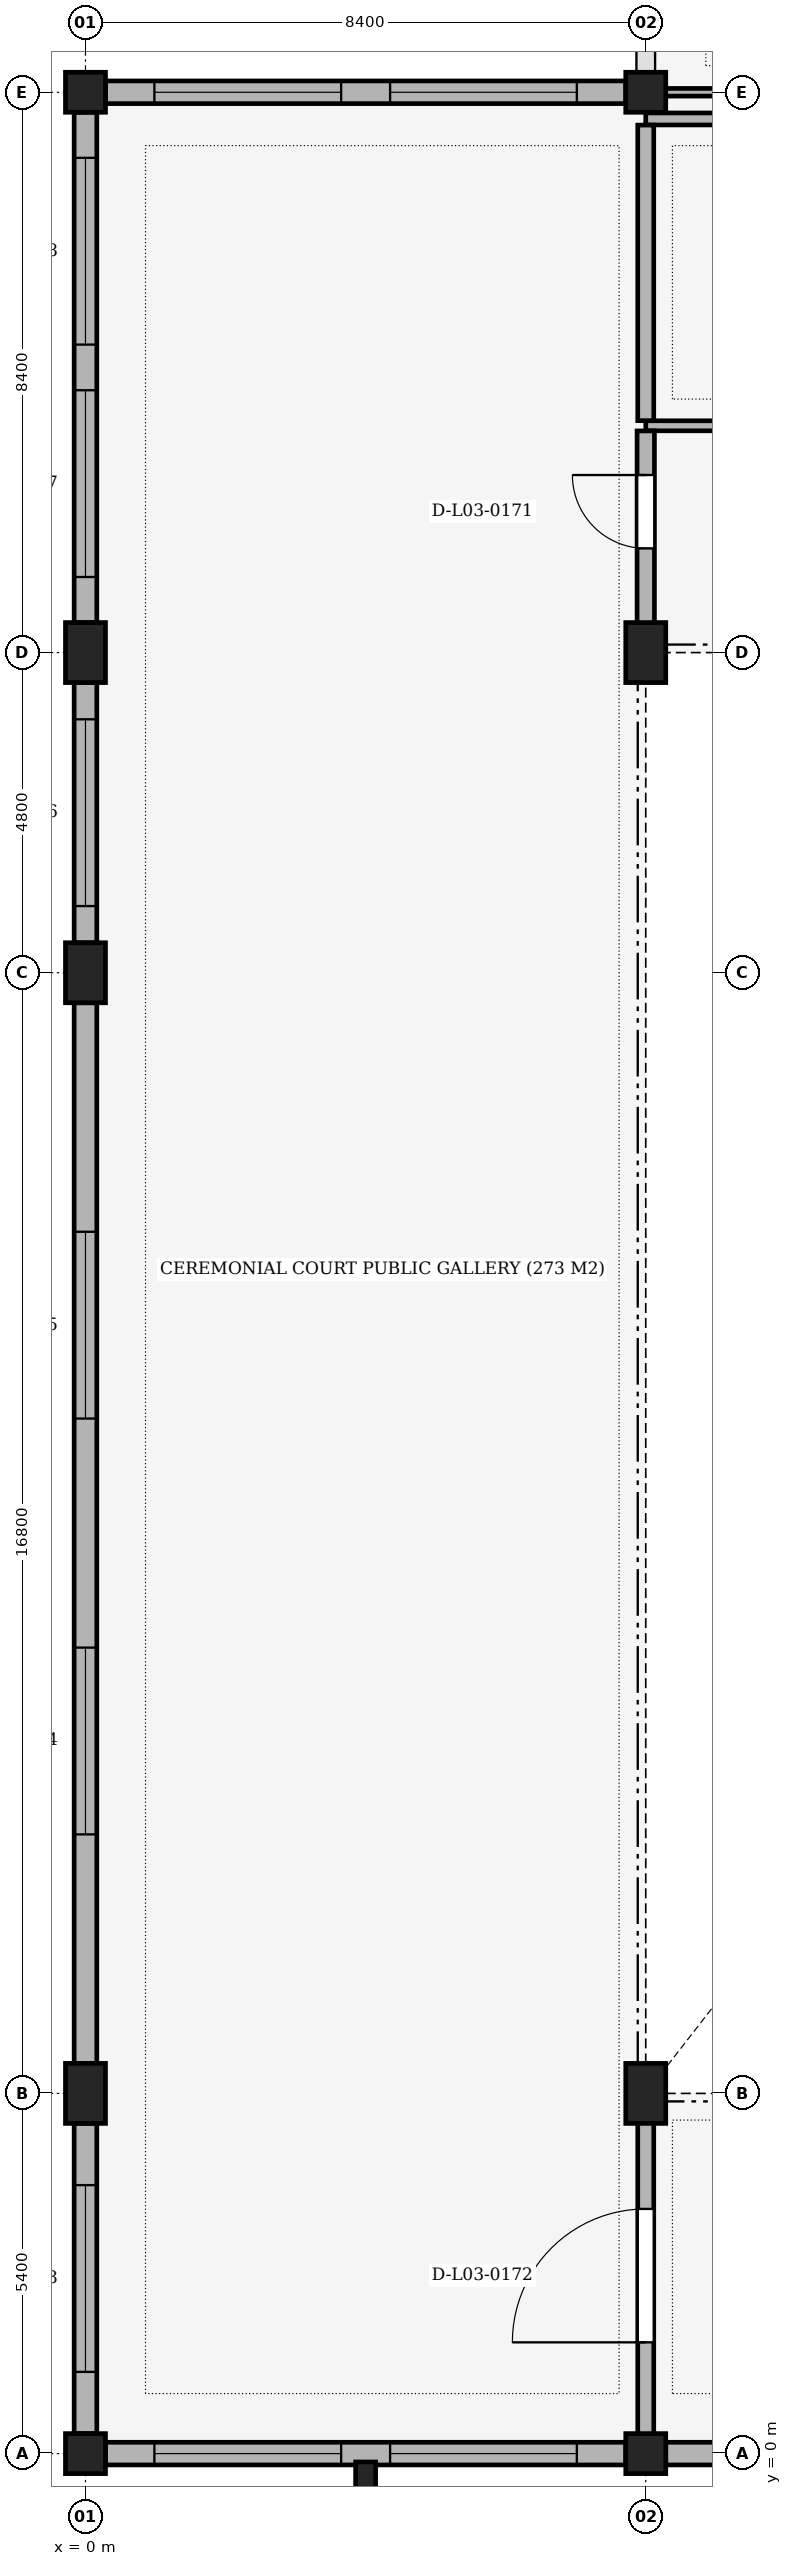
"""IFC4 building model, lengths in metres.
Left out: names, types, materials, properties, quantities, classifications, styles, units other than length and angle.
Written with IfcOpenShell. Run it as: python <this file> out.ifc"""

import sys

from ifc_helpers import new_model, si_unit, direction, frame, frame_2d, origin, origin_with_axes, origin_2d, place, context, subcontext, project, spatial, rectangle, extrude, element, fill, save


model = new_model("IFC4")
c1 = context("Model", 3, precision=1e-05, world=origin(), true_north=direction((0.0, 1.0)))
c2 = subcontext(c1, "Body", "Model", "MODEL_VIEW")
j1 = project(units=[si_unit("LENGTHUNIT", "METRE"), si_unit("PLANEANGLEUNIT", "RADIAN")], contexts=[c1])
p1 = place(None, origin())
s1 = spatial("IfcSite", under=j1, at=p1, CompositionType="ELEMENT")
p2 = place(p1, origin())
s2 = spatial("IfcBuilding", under=s1, at=p2, CompositionType="ELEMENT")
p3 = place(p2, frame((0.0, 0.0, 15.3)))
s3 = spatial("IfcBuildingStorey", under=s2, at=p3, CompositionType="ELEMENT", Elevation=15.3)
p4 = place(p3, origin_with_axes())
e1 = element("IfcColumn", 1, at=p4, inside=s3, PredefinedType="COLUMN", context=c2, shape_type="SweptSolid", body=[
    extrude(rectangle(XDim=0.6, YDim=0.6, at=origin_2d()), origin(), (0.0, 0.0, 1.0), 5.1),
])
for number, where, z_axis, x_axis in (
    (2, (0.0, 5.4, 0.0), (0.0, 0.0, 1.0), (1.0, 0.0, 0.0)),
    (3, (0.0, 22.2, 0.0), (0.0, 0.0, 1.0), (1.0, 0.0, 0.0)),
    (4, (0.0, 27.0, 0.0), (0.0, 0.0, 1.0), (1.0, 0.0, 0.0)),
):
    element("IfcColumn", number, at=place(p3, frame(where, z_axis=z_axis, x_axis=x_axis)), inside=s3, PredefinedType="COLUMN", context=c2, shape_type="SweptSolid", body=[
        extrude(rectangle(XDim=0.6, YDim=0.9, at=origin_2d()), origin(), (0.0, 0.0, 1.0), 5.1),
    ])
for number, where, z_axis, x_axis in (
    (5, (0.0, 35.4, 0.0), (0.0, 0.0, 1.0), (1.0, 0.0, 0.0)),
    (6, (8.4, 0.0, 0.0), (0.0, 0.0, 1.0), (1.0, 0.0, 0.0)),
):
    element("IfcColumn", number, at=place(p3, frame(where, z_axis=z_axis, x_axis=x_axis)), inside=s3, PredefinedType="COLUMN", context=c2, shape_type="SweptSolid", body=[
        extrude(rectangle(XDim=0.6, YDim=0.6, at=origin_2d()), origin(), (0.0, 0.0, 1.0), 5.1),
    ])
for number, where, z_axis, x_axis in (
    (7, (8.4, 5.4, 0.0), (0.0, 0.0, 1.0), (1.0, 0.0, 0.0)),
    (8, (8.4, 27.0, 0.0), (0.0, 0.0, 1.0), (1.0, 0.0, 0.0)),
):
    element("IfcColumn", number, at=place(p3, frame(where, z_axis=z_axis, x_axis=x_axis)), inside=s3, PredefinedType="COLUMN", context=c2, shape_type="SweptSolid", body=[
        extrude(rectangle(XDim=0.6, YDim=0.9, at=origin_2d()), origin(), (0.0, 0.0, 1.0), 5.1),
    ])
p5 = place(p3, frame((8.4, 35.4, 0.0), z_axis=(0.0, 0.0, 1.0), x_axis=(1.0, 0.0, 0.0)))
e9 = element("IfcColumn", 9, at=p5, inside=s3, PredefinedType="COLUMN", context=c2, shape_type="SweptSolid", body=[
    extrude(rectangle(XDim=0.6, YDim=0.6, at=origin_2d()), origin(), (0.0, 0.0, 1.0), 5.1),
])
p6 = place(p3, frame((4.2, -0.35, 0.0), z_axis=(0.0, 0.0, 1.0), x_axis=(1.0, 0.0, 0.0)))
e10 = element("IfcColumn", 10, at=p6, inside=s3, PredefinedType="PILASTER", context=c2, shape_type="SweptSolid", body=[
    extrude(rectangle(XDim=0.3, YDim=0.45, at=origin_2d()), origin(), (0.0, 0.0, 1.0), 5.1),
])
p7 = place(p3, frame((0.3, 35.4, 0.0), z_axis=(0.0, 0.0, 1.0), x_axis=(1.0, 0.0, 0.0)))
e11 = element("IfcWall", 11, at=p7, inside=s3, PredefinedType="SOLIDWALL", context=c2, shape_type="SweptSolid", body=[
    extrude(rectangle(XDim=7.8, YDim=0.34, at=frame_2d((3.9, 0.0))), origin(), (0.0, 0.0, 1.0), 4.14),
])
p8 = place(p7, frame((0.733, 0.0, 0.75)))
e12 = element("IfcOpeningElement", 12, at=p8, cuts=e11, PredefinedType="OPENING", context=c2, shape_type="SweptSolid", body=[
    extrude(rectangle(XDim=2.8, YDim=2.6, at=frame_2d((1.4, 1.3))), frame((0.0, 0.185, 0.0), z_axis=(0.0, -1.0, 0.0), x_axis=(1.0, 0.0, 0.0)), (0.0, 0.0, 1.0), 0.37),
])
p9 = place(p7, frame((4.267, 0.0, 0.75)))
e13 = element("IfcOpeningElement", 13, at=p9, cuts=e11, PredefinedType="OPENING", context=c2, shape_type="SweptSolid", body=[
    extrude(rectangle(XDim=2.8, YDim=2.6, at=frame_2d((1.4, 1.3))), frame((0.0, 0.185, 0.0), z_axis=(0.0, -1.0, 0.0), x_axis=(1.0, 0.0, 0.0)), (0.0, 0.0, 1.0), 0.37),
])
p10 = place(p3, frame((16.5, 0.0, 0.0), z_axis=(0.0, 0.0, 1.0), x_axis=(-1.0, 0.0, 0.0)))
e14 = element("IfcWall", 14, at=p10, inside=s3, PredefinedType="SOLIDWALL", context=c2, shape_type="SweptSolid", body=[
    extrude(rectangle(XDim=7.8, YDim=0.34, at=frame_2d((3.9, 0.0))), origin(), (0.0, 0.0, 1.0), 4.14),
])
p11 = place(p10, frame((0.733, 0.0, 0.75)))
e15 = element("IfcOpeningElement", 15, at=p11, cuts=e14, PredefinedType="OPENING", context=c2, shape_type="SweptSolid", body=[
    extrude(rectangle(XDim=2.8, YDim=2.6, at=frame_2d((1.4, 1.3))), frame((0.0, 0.185, 0.0), z_axis=(0.0, -1.0, 0.0), x_axis=(1.0, 0.0, 0.0)), (0.0, 0.0, 1.0), 0.37),
])
p12 = place(p10, frame((4.267, 0.0, 0.75)))
e16 = element("IfcOpeningElement", 16, at=p12, cuts=e14, PredefinedType="OPENING", context=c2, shape_type="SweptSolid", body=[
    extrude(rectangle(XDim=2.8, YDim=2.6, at=frame_2d((1.4, 1.3))), frame((0.0, 0.185, 0.0), z_axis=(0.0, -1.0, 0.0), x_axis=(1.0, 0.0, 0.0)), (0.0, 0.0, 1.0), 0.37),
])
p13 = place(p3, frame((8.1, 0.0, 0.0), z_axis=(0.0, 0.0, 1.0), x_axis=(-1.0, 0.0, 0.0)))
e17 = element("IfcWall", 17, at=p13, inside=s3, PredefinedType="SOLIDWALL", context=c2, shape_type="SweptSolid", body=[
    extrude(rectangle(XDim=7.8, YDim=0.34, at=frame_2d((3.9, 0.0))), origin(), (0.0, 0.0, 1.0), 4.14),
])
p14 = place(p13, frame((0.733, 0.0, 0.75)))
e18 = element("IfcOpeningElement", 18, at=p14, cuts=e17, PredefinedType="OPENING", context=c2, shape_type="SweptSolid", body=[
    extrude(rectangle(XDim=2.8, YDim=2.6, at=frame_2d((1.4, 1.3))), frame((0.0, 0.185, 0.0), z_axis=(0.0, -1.0, 0.0), x_axis=(1.0, 0.0, 0.0)), (0.0, 0.0, 1.0), 0.37),
])
p15 = place(p13, frame((4.267, 0.0, 0.75)))
e19 = element("IfcOpeningElement", 19, at=p15, cuts=e17, PredefinedType="OPENING", context=c2, shape_type="SweptSolid", body=[
    extrude(rectangle(XDim=2.8, YDim=2.6, at=frame_2d((1.4, 1.3))), frame((0.0, 0.185, 0.0), z_axis=(0.0, -1.0, 0.0), x_axis=(1.0, 0.0, 0.0)), (0.0, 0.0, 1.0), 0.37),
])
p16 = place(p3, frame((0.0, 0.3, 0.0), z_axis=(0.0, 0.0, 1.0), x_axis=(0.0, 1.0, 0.0)))
e20 = element("IfcWall", 20, at=p16, inside=s3, PredefinedType="SOLIDWALL", context=c2, shape_type="SweptSolid", body=[
    extrude(rectangle(XDim=4.65, YDim=0.34, at=frame_2d((2.325, 0.0))), origin(), (0.0, 0.0, 1.0), 4.29),
])
p17 = place(p16, frame((0.925, 0.0, 0.75)))
e21 = element("IfcOpeningElement", 21, at=p17, cuts=e20, PredefinedType="OPENING", context=c2, shape_type="SweptSolid", body=[
    extrude(rectangle(XDim=2.8, YDim=2.6, at=frame_2d((1.4, 1.3))), frame((0.0, 0.185, 0.0), z_axis=(0.0, -1.0, 0.0), x_axis=(1.0, 0.0, 0.0)), (0.0, 0.0, 1.0), 0.37),
])
p18 = place(p3, frame((0.0, 5.85, 0.0), z_axis=(0.0, 0.0, 1.0), x_axis=(0.0, 1.0, 0.0)))
e22 = element("IfcWall", 22, at=p18, inside=s3, PredefinedType="SOLIDWALL", context=c2, shape_type="SweptSolid", body=[
    extrude(rectangle(XDim=15.9, YDim=0.34, at=frame_2d((7.95, 0.0))), origin(), (0.0, 0.0, 1.0), 3.79),
])
p19 = place(p18, frame((3.433, 0.0, 0.75)))
e23 = element("IfcOpeningElement", 23, at=p19, cuts=e22, PredefinedType="OPENING", context=c2, shape_type="SweptSolid", body=[
    extrude(rectangle(XDim=2.8, YDim=2.6, at=frame_2d((1.4, 1.3))), frame((0.0, 0.185, 0.0), z_axis=(0.0, -1.0, 0.0), x_axis=(1.0, 0.0, 0.0)), (0.0, 0.0, 1.0), 0.37),
])
p20 = place(p18, frame((9.667, 0.0, 0.75)))
e24 = element("IfcOpeningElement", 24, at=p20, cuts=e22, PredefinedType="OPENING", context=c2, shape_type="SweptSolid", body=[
    extrude(rectangle(XDim=2.8, YDim=2.6, at=frame_2d((1.4, 1.3))), frame((0.0, 0.185, 0.0), z_axis=(0.0, -1.0, 0.0), x_axis=(1.0, 0.0, 0.0)), (0.0, 0.0, 1.0), 0.37),
])
p21 = place(p3, frame((0.0, 22.65, 0.0), z_axis=(0.0, 0.0, 1.0), x_axis=(0.0, 1.0, 0.0)))
e25 = element("IfcWall", 25, at=p21, inside=s3, PredefinedType="SOLIDWALL", context=c2, shape_type="SweptSolid", body=[
    extrude(rectangle(XDim=3.9, YDim=0.34, at=frame_2d((1.95, 0.0))), origin(), (0.0, 0.0, 1.0), 4.29),
])
p22 = place(p21, frame((0.55, 0.0, 0.75)))
e26 = element("IfcOpeningElement", 26, at=p22, cuts=e25, PredefinedType="OPENING", context=c2, shape_type="SweptSolid", body=[
    extrude(rectangle(XDim=2.8, YDim=2.6, at=frame_2d((1.4, 1.3))), frame((0.0, 0.185, 0.0), z_axis=(0.0, -1.0, 0.0), x_axis=(1.0, 0.0, 0.0)), (0.0, 0.0, 1.0), 0.37),
])
p23 = place(p3, frame((0.0, 27.45, 0.0), z_axis=(0.0, 0.0, 1.0), x_axis=(0.0, 1.0, 0.0)))
e27 = element("IfcWall", 27, at=p23, inside=s3, PredefinedType="SOLIDWALL", context=c2, shape_type="SweptSolid", body=[
    extrude(rectangle(XDim=7.65, YDim=0.34, at=frame_2d((3.825, 0.0))), origin(), (0.0, 0.0, 1.0), 4.14),
])
p24 = place(p23, frame((0.683, 0.0, 0.75)))
e28 = element("IfcOpeningElement", 28, at=p24, cuts=e27, PredefinedType="OPENING", context=c2, shape_type="SweptSolid", body=[
    extrude(rectangle(XDim=2.8, YDim=2.6, at=frame_2d((1.4, 1.3))), frame((0.0, 0.185, 0.0), z_axis=(0.0, -1.0, 0.0), x_axis=(1.0, 0.0, 0.0)), (0.0, 0.0, 1.0), 0.37),
])
p25 = place(p23, frame((4.167, 0.0, 0.75)))
e29 = element("IfcOpeningElement", 29, at=p25, cuts=e27, PredefinedType="OPENING", context=c2, shape_type="SweptSolid", body=[
    extrude(rectangle(XDim=2.8, YDim=2.6, at=frame_2d((1.4, 1.3))), frame((0.0, 0.185, 0.0), z_axis=(0.0, -1.0, 0.0), x_axis=(1.0, 0.0, 0.0)), (0.0, 0.0, 1.0), 0.37),
])
p26 = place(p3, frame((8.4, 30.4, 0.0), z_axis=(0.0, 0.0, 1.0), x_axis=(1.0, 0.0, 0.0)))
e30 = element("IfcWall", 30, at=p26, inside=s3, PredefinedType="PARTITIONING", context=c2, shape_type="SweptSolid", body=[
    extrude(rectangle(XDim=16.0, YDim=0.15, at=frame_2d((8.0, 0.0))), origin(), (0.0, 0.0, 1.0), 4.14),
])
p27 = place(p26, frame((7.2, 0.0, 0.0)))
e31 = element("IfcOpeningElement", 31, at=p27, cuts=e30, PredefinedType="OPENING", context=c2, shape_type="SweptSolid", body=[
    extrude(rectangle(XDim=1.6, YDim=2.3, at=frame_2d((0.8, 1.15))), frame((0.0, 0.09, 0.0), z_axis=(0.0, -1.0, 0.0), x_axis=(1.0, 0.0, 0.0)), (0.0, 0.0, 1.0), 0.18),
])
p28 = place(p3, frame((8.4, 35.0, 0.0), z_axis=(0.0, 0.0, 1.0), x_axis=(1.0, 0.0, 0.0)))
e32 = element("IfcWall", 32, at=p28, inside=s3, PredefinedType="PARTITIONING", context=c2, shape_type="SweptSolid", body=[
    extrude(rectangle(XDim=16.0, YDim=0.18, at=frame_2d((8.0, 0.0))), origin(), (0.0, 0.0, 1.0), 4.14),
])
p29 = place(p3, frame((8.452, 35.4, 0.0), z_axis=(0.0, 0.0, 1.0), x_axis=(1.0, 0.0, 0.0)))
e33 = element("IfcWall", 33, at=p29, inside=s3, PredefinedType="PARTITIONING", context=c2, shape_type="SweptSolid", body=[
    extrude(rectangle(XDim=5.348, YDim=0.115, at=frame_2d((2.674, 0.0))), origin(), (0.0, 0.0, 1.0), 4.14),
])
p30 = place(p3, frame((8.4, -0.064, 0.0), z_axis=(0.0, 0.0, 1.0), x_axis=(0.0, 1.0, 0.0)))
e34 = element("IfcWall", 34, at=p30, inside=s3, PredefinedType="PARTITIONING", context=c2, shape_type="SweptSolid", body=[
    extrude(rectangle(XDim=5.464, YDim=0.24, at=frame_2d((2.732, 0.0))), origin(), (0.0, 0.0, 1.0), 3.69),
])
p31 = place(p30, frame((1.732, 0.0, 0.0)))
e35 = element("IfcOpeningElement", 35, at=p31, cuts=e34, PredefinedType="OPENING", context=c2, shape_type="SweptSolid", body=[
    extrude(rectangle(XDim=2.0, YDim=2.5, at=frame_2d((1.0, 1.25))), frame((0.0, 0.135, 0.0), z_axis=(0.0, -1.0, 0.0), x_axis=(1.0, 0.0, 0.0)), (0.0, 0.0, 1.0), 0.27),
])
p32 = place(p3, frame((8.4, 27.0, 0.0), z_axis=(0.0, 0.0, 1.0), x_axis=(0.0, 1.0, 0.0)))
e36 = element("IfcWall", 36, at=p32, inside=s3, PredefinedType="PARTITIONING", context=c2, shape_type="SweptSolid", body=[
    extrude(rectangle(XDim=3.323, YDim=0.26, at=frame_2d((1.662, 0.0))), origin(), (0.0, 0.0, 1.0), 3.69),
])
p33 = place(p32, frame((1.562, 0.0, 0.0)))
e37 = element("IfcOpeningElement", 37, at=p33, cuts=e36, PredefinedType="OPENING", context=c2, shape_type="SweptSolid", body=[
    extrude(rectangle(XDim=1.1, YDim=2.1, at=frame_2d((0.55, 1.05))), frame((0.0, 0.145, 0.0), z_axis=(0.0, -1.0, 0.0), x_axis=(1.0, 0.0, 0.0)), (0.0, 0.0, 1.0), 0.29),
])
p34 = place(p3, frame((8.4, 30.477, 0.0), z_axis=(0.0, 0.0, 1.0), x_axis=(0.0, 1.0, 0.0)))
e38 = element("IfcWall", 38, at=p34, inside=s3, PredefinedType="PARTITIONING", context=c2, shape_type="SweptSolid", body=[
    extrude(rectangle(XDim=4.431, YDim=0.24, at=frame_2d((2.215, 0.0))), origin(), (0.0, 0.0, 1.0), 4.14),
])
p35 = place(p8, origin())
e39 = element("IfcWindow", 39, at=p35, inside=s3, PartitioningType="SINGLE_PANEL", PredefinedType="WINDOW", context=c2, shape_type="SweptSolid", body=[
    extrude(rectangle(XDim=2.8, YDim=2.6, at=frame_2d((1.4, 1.3))), frame((0.0, 0.03, 0.0), z_axis=(0.0, -1.0, 0.0), x_axis=(1.0, 0.0, 0.0)), (0.0, 0.0, 1.0), 0.06),
])
fill(e12, e39)
p36 = place(p9, origin())
e40 = element("IfcWindow", 40, at=p36, inside=s3, PartitioningType="SINGLE_PANEL", PredefinedType="WINDOW", context=c2, shape_type="SweptSolid", body=[
    extrude(rectangle(XDim=2.8, YDim=2.6, at=frame_2d((1.4, 1.3))), frame((0.0, 0.03, 0.0), z_axis=(0.0, -1.0, 0.0), x_axis=(1.0, 0.0, 0.0)), (0.0, 0.0, 1.0), 0.06),
])
fill(e13, e40)
p37 = place(p14, origin())
e41 = element("IfcWindow", 41, at=p37, inside=s3, PartitioningType="SINGLE_PANEL", PredefinedType="WINDOW", context=c2, shape_type="SweptSolid", body=[
    extrude(rectangle(XDim=2.8, YDim=2.6, at=frame_2d((1.4, 1.3))), frame((0.0, 0.03, 0.0), z_axis=(0.0, -1.0, 0.0), x_axis=(1.0, 0.0, 0.0)), (0.0, 0.0, 1.0), 0.06),
])
fill(e18, e41)
p38 = place(p15, origin())
e42 = element("IfcWindow", 42, at=p38, inside=s3, PartitioningType="SINGLE_PANEL", PredefinedType="WINDOW", context=c2, shape_type="SweptSolid", body=[
    extrude(rectangle(XDim=2.8, YDim=2.6, at=frame_2d((1.4, 1.3))), frame((0.0, 0.03, 0.0), z_axis=(0.0, -1.0, 0.0), x_axis=(1.0, 0.0, 0.0)), (0.0, 0.0, 1.0), 0.06),
])
fill(e19, e42)
p39 = place(p17, origin())
e43 = element("IfcWindow", 43, at=p39, inside=s3, PartitioningType="SINGLE_PANEL", PredefinedType="WINDOW", context=c2, shape_type="SweptSolid", body=[
    extrude(rectangle(XDim=2.8, YDim=2.6, at=frame_2d((1.4, 1.3))), frame((0.0, 0.03, 0.0), z_axis=(0.0, -1.0, 0.0), x_axis=(1.0, 0.0, 0.0)), (0.0, 0.0, 1.0), 0.06),
])
fill(e21, e43)
p40 = place(p19, origin())
e44 = element("IfcWindow", 44, at=p40, inside=s3, PartitioningType="SINGLE_PANEL", PredefinedType="WINDOW", context=c2, shape_type="SweptSolid", body=[
    extrude(rectangle(XDim=2.8, YDim=2.6, at=frame_2d((1.4, 1.3))), frame((0.0, 0.03, 0.0), z_axis=(0.0, -1.0, 0.0), x_axis=(1.0, 0.0, 0.0)), (0.0, 0.0, 1.0), 0.06),
])
fill(e23, e44)
p41 = place(p20, origin())
e45 = element("IfcWindow", 45, at=p41, inside=s3, PartitioningType="SINGLE_PANEL", PredefinedType="WINDOW", context=c2, shape_type="SweptSolid", body=[
    extrude(rectangle(XDim=2.8, YDim=2.6, at=frame_2d((1.4, 1.3))), frame((0.0, 0.03, 0.0), z_axis=(0.0, -1.0, 0.0), x_axis=(1.0, 0.0, 0.0)), (0.0, 0.0, 1.0), 0.06),
])
fill(e24, e45)
p42 = place(p22, origin())
e46 = element("IfcWindow", 46, at=p42, inside=s3, PartitioningType="SINGLE_PANEL", PredefinedType="WINDOW", context=c2, shape_type="SweptSolid", body=[
    extrude(rectangle(XDim=2.8, YDim=2.6, at=frame_2d((1.4, 1.3))), frame((0.0, 0.03, 0.0), z_axis=(0.0, -1.0, 0.0), x_axis=(1.0, 0.0, 0.0)), (0.0, 0.0, 1.0), 0.06),
])
fill(e26, e46)
p43 = place(p24, origin())
e47 = element("IfcWindow", 47, at=p43, inside=s3, PartitioningType="SINGLE_PANEL", PredefinedType="WINDOW", context=c2, shape_type="SweptSolid", body=[
    extrude(rectangle(XDim=2.8, YDim=2.6, at=frame_2d((1.4, 1.3))), frame((0.0, 0.03, 0.0), z_axis=(0.0, -1.0, 0.0), x_axis=(1.0, 0.0, 0.0)), (0.0, 0.0, 1.0), 0.06),
])
fill(e28, e47)
p44 = place(p25, origin())
e48 = element("IfcWindow", 48, at=p44, inside=s3, PartitioningType="SINGLE_PANEL", PredefinedType="WINDOW", context=c2, shape_type="SweptSolid", body=[
    extrude(rectangle(XDim=2.8, YDim=2.6, at=frame_2d((1.4, 1.3))), frame((0.0, 0.03, 0.0), z_axis=(0.0, -1.0, 0.0), x_axis=(1.0, 0.0, 0.0)), (0.0, 0.0, 1.0), 0.06),
])
fill(e29, e48)
p45 = place(p33, origin())
e49 = element("IfcDoor", 49, at=p45, inside=s3, OperationType="SINGLE_SWING_RIGHT", PredefinedType="DOOR", context=c2, shape_type="SweptSolid", body=[
    extrude(rectangle(XDim=1.1, YDim=2.1, at=frame_2d((0.55, 1.05))), frame((0.0, 0.025, 0.0), z_axis=(0.0, -1.0, 0.0), x_axis=(1.0, 0.0, 0.0)), (0.0, 0.0, 1.0), 0.05),
])
fill(e37, e49)
p46 = place(p31, origin())
e50 = element("IfcDoor", 50, at=p46, inside=s3, OperationType="SINGLE_SWING_LEFT", PredefinedType="DOOR", context=c2, shape_type="SweptSolid", body=[
    extrude(rectangle(XDim=2.0, YDim=2.5, at=frame_2d((1.0, 1.25))), frame((0.0, 0.025, 0.0), z_axis=(0.0, -1.0, 0.0), x_axis=(1.0, 0.0, 0.0)), (0.0, 0.0, 1.0), 0.05),
])
fill(e35, e50)
save(model, sys.argv[1])
